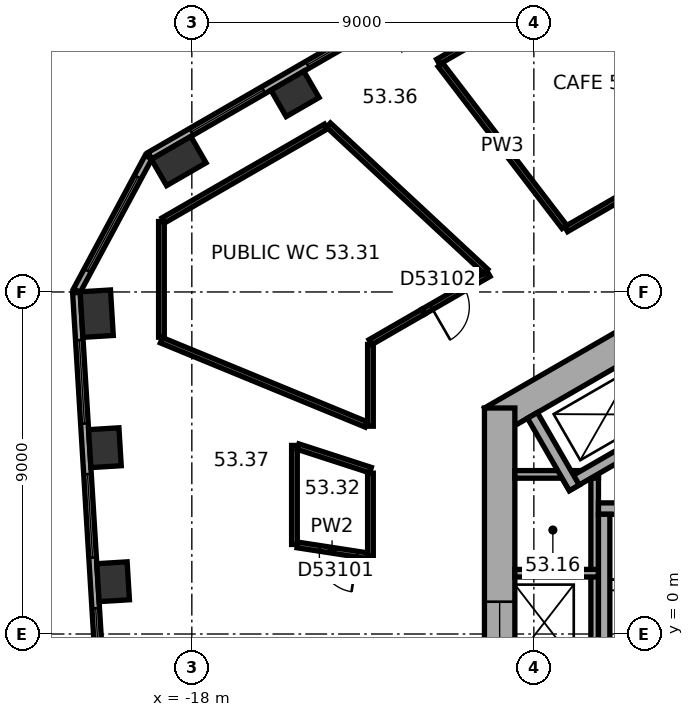
"""IFC4 building model, lengths in metres.
Left out: names, types, materials, properties, quantities, classifications, styles, units other than length and angle.
Written with IfcOpenShell. Run it as: python <this file> out.ifc"""

import sys

from ifc_helpers import new_model, si_unit, direction, frame, frame_2d, origin, origin_2d, place, context, subcontext, project, spatial, rectangle, extrude, element, fill, save


model = new_model("IFC4")
c1 = context("Model", 3, precision=1e-05, world=origin(), true_north=direction((0.0, 1.0)))
c2 = subcontext(c1, "Body", "Model", "MODEL_VIEW")
j1 = project(units=[si_unit("LENGTHUNIT", "METRE"), si_unit("PLANEANGLEUNIT", "RADIAN")], contexts=[c1])
p1 = place(None, origin())
s1 = spatial("IfcSite", under=j1, at=p1, CompositionType="ELEMENT")
p2 = place(p1, origin())
s2 = spatial("IfcBuilding", under=s1, at=p2, CompositionType="ELEMENT")
p3 = place(p2, frame((0.0, 0.0, 214.3)))
s3 = spatial("IfcBuildingStorey", under=s2, at=p3, CompositionType="ELEMENT", Elevation=214.3)
p4 = place(p3, frame((-15.285, 14.211, 0.0), z_axis=(0.0, 0.0, 1.0), x_axis=(-0.866025403784, -0.5, 0.0)))
e1 = element("IfcColumn", 1, at=p4, inside=s3, PredefinedType="COLUMN", context=c2, shape_type="SweptSolid", body=[
    extrude(rectangle(XDim=1.0, YDim=0.8, at=origin_2d()), origin(), (0.0, 0.0, 1.0), 7.4),
])
for number, where, z_axis, x_axis in (
    (2, (-18.345, 12.445, 0.0), (0.0, 0.0, 1.0), (-0.866, -0.5, 0.0)),
    (3, (-20.503, 8.429, 0.0), (0.0, 0.0, 1.0), (0.061, -0.998, 0.0)),
):
    element("IfcColumn", number, at=place(p3, frame(where, z_axis=z_axis, x_axis=x_axis)), inside=s3, PredefinedType="COLUMN", context=c2, shape_type="SweptSolid", body=[
        extrude(rectangle(XDim=1.2, YDim=0.8, at=origin_2d()), origin(), (0.0, 0.0, 1.0), 7.4),
    ])
for number, where, z_axis, x_axis in (
    (4, (-20.287, 4.902, 0.0), (0.0, 0.0, 1.0), (0.061, -0.998, 0.0)),
    (5, (-20.071, 1.375, 0.0), (0.0, 0.0, 1.0), (0.061, -0.998, 0.0)),
):
    element("IfcColumn", number, at=place(p3, frame(where, z_axis=z_axis, x_axis=x_axis)), inside=s3, PredefinedType="COLUMN", context=c2, shape_type="SweptSolid", body=[
        extrude(rectangle(XDim=1.0, YDim=0.8, at=origin_2d()), origin(), (0.0, 0.0, 1.0), 7.4),
    ])
p5 = place(p3, frame((0.2, 11.547, 0.0), z_axis=(0.0, 0.0, 1.0), x_axis=(-0.866023897231, -0.500002609418, 0.0)))
e6 = element("IfcWall", 6, at=p5, inside=s3, PredefinedType="SHEAR", context=c2, shape_type="SweptSolid", body=[
    extrude(rectangle(XDim=11.894, YDim=0.8, at=frame_2d((5.947, 0.0))), origin(), (0.0, 0.0, 1.0), 7.4),
])
p6 = place(p5, frame((6.147, 0.0, 0.0)))
e7 = element("IfcOpeningElement", 7, at=p6, cuts=e6, PredefinedType="OPENING", context=c2, shape_type="SweptSolid", body=[
    extrude(rectangle(XDim=1.5, YDim=2.1, at=frame_2d((0.75, 1.05))), frame((0.0, 0.41, 0.0), z_axis=(0.0, -1.0, 0.0), x_axis=(1.0, 0.0, 0.0)), (0.0, 0.0, 1.0), 0.82),
])
p7 = place(p5, frame((1.697, 0.0, 0.0)))
e8 = element("IfcOpeningElement", 8, at=p7, cuts=e6, PredefinedType="OPENING", context=c2, shape_type="SweptSolid", body=[
    extrude(rectangle(XDim=0.9, YDim=2.1, at=frame_2d((0.45, 1.05))), frame((0.0, 0.41, 0.0), z_axis=(0.0, -1.0, 0.0), x_axis=(1.0, 0.0, 0.0)), (0.0, 0.0, 1.0), 0.82),
])
p8 = place(p5, frame((4.297, 0.0, 0.0)))
e9 = element("IfcOpeningElement", 9, at=p8, cuts=e6, PredefinedType="OPENING", context=c2, shape_type="SweptSolid", body=[
    extrude(rectangle(XDim=0.9, YDim=2.1, at=frame_2d((0.45, 1.05))), frame((0.0, 0.41, 0.0), z_axis=(0.0, -1.0, 0.0), x_axis=(1.0, 0.0, 0.0)), (0.0, 0.0, 1.0), 0.82),
])
p9 = place(p3, frame((-9.9, 5.947, 0.0), z_axis=(0.0, 0.0, 1.0), x_axis=(0.0, -1.0, 0.0)))
e10 = element("IfcWall", 10, at=p9, inside=s3, PredefinedType="SHEAR", context=c2, shape_type="SweptSolid", body=[
    extrude(rectangle(XDim=11.894, YDim=0.8, at=frame_2d((5.947, 0.0))), origin(), (0.0, 0.0, 1.0), 7.4),
])
p10 = place(p9, frame((5.097, 0.0, 0.0)))
e11 = element("IfcOpeningElement", 11, at=p10, cuts=e10, PredefinedType="OPENING", context=c2, shape_type="SweptSolid", body=[
    extrude(rectangle(XDim=1.1, YDim=2.1, at=frame_2d((0.55, 1.05))), frame((0.0, 0.41, 0.0), z_axis=(0.0, -1.0, 0.0), x_axis=(1.0, 0.0, 0.0)), (0.0, 0.0, 1.0), 0.82),
])
p11 = place(p9, frame((7.697, 0.0, 0.0)))
e12 = element("IfcOpeningElement", 12, at=p11, cuts=e10, PredefinedType="OPENING", context=c2, shape_type="SweptSolid", body=[
    extrude(rectangle(XDim=1.1, YDim=2.1, at=frame_2d((0.55, 1.05))), frame((0.0, 0.41, 0.0), z_axis=(0.0, -1.0, 0.0), x_axis=(1.0, 0.0, 0.0)), (0.0, 0.0, 1.0), 0.82),
])
p12 = place(p3, frame((-2.786, 22.005, 0.0), z_axis=(0.0, 0.0, 1.0), x_axis=(-0.866026555358, -0.49999800541, 0.0)))
e13 = element("IfcWall", 13, at=p12, inside=s3, PredefinedType="STANDARD", context=c2, shape_type="SweptSolid", body=[
    extrude(rectangle(XDim=18.841, YDim=0.2, at=frame_2d((9.421, 0.0))), origin(), (0.0, 0.0, 1.0), 7.4),
])
p13 = place(p12, frame((1.254, 0.0, 0.8)))
e14 = element("IfcOpeningElement", 14, at=p13, cuts=e13, PredefinedType="OPENING", context=c2, shape_type="SweptSolid", body=[
    extrude(rectangle(XDim=2.2, YDim=4.2, at=frame_2d((1.1, 2.1))), frame((0.0, 0.11, 0.0), z_axis=(0.0, -1.0, 0.0), x_axis=(1.0, 0.0, 0.0)), (0.0, 0.0, 1.0), 0.22),
])
p14 = place(p12, frame((4.788, 0.0, 0.8)))
e15 = element("IfcOpeningElement", 15, at=p14, cuts=e13, PredefinedType="OPENING", context=c2, shape_type="SweptSolid", body=[
    extrude(rectangle(XDim=2.2, YDim=4.2, at=frame_2d((1.1, 2.1))), frame((0.0, 0.11, 0.0), z_axis=(0.0, -1.0, 0.0), x_axis=(1.0, 0.0, 0.0)), (0.0, 0.0, 1.0), 0.22),
])
p15 = place(p12, frame((8.321, 0.0, 0.8)))
e16 = element("IfcOpeningElement", 16, at=p15, cuts=e13, PredefinedType="OPENING", context=c2, shape_type="SweptSolid", body=[
    extrude(rectangle(XDim=2.2, YDim=4.2, at=frame_2d((1.1, 2.1))), frame((0.0, 0.11, 0.0), z_axis=(0.0, -1.0, 0.0), x_axis=(1.0, 0.0, 0.0)), (0.0, 0.0, 1.0), 0.22),
])
p16 = place(p12, frame((11.855, 0.0, 0.8)))
e17 = element("IfcOpeningElement", 17, at=p16, cuts=e13, PredefinedType="OPENING", context=c2, shape_type="SweptSolid", body=[
    extrude(rectangle(XDim=2.2, YDim=4.2, at=frame_2d((1.1, 2.1))), frame((0.0, 0.11, 0.0), z_axis=(0.0, -1.0, 0.0), x_axis=(1.0, 0.0, 0.0)), (0.0, 0.0, 1.0), 0.22),
])
p17 = place(p12, frame((15.389, 0.0, 0.8)))
e18 = element("IfcOpeningElement", 18, at=p17, cuts=e13, PredefinedType="OPENING", context=c2, shape_type="SweptSolid", body=[
    extrude(rectangle(XDim=2.2, YDim=4.2, at=frame_2d((1.1, 2.1))), frame((0.0, 0.11, 0.0), z_axis=(0.0, -1.0, 0.0), x_axis=(1.0, 0.0, 0.0)), (0.0, 0.0, 1.0), 0.22),
])
p18 = place(p3, frame((-19.141, 12.545, 0.0), z_axis=(0.0, 0.0, 1.0), x_axis=(-0.473306370921, -0.880897882416, 0.0)))
e19 = element("IfcWall", 19, at=p18, inside=s3, PredefinedType="STANDARD", context=c2, shape_type="SweptSolid", body=[
    extrude(rectangle(XDim=3.983, YDim=0.2, at=frame_2d((1.991, 0.0))), origin(), (0.0, 0.0, 1.0), 7.4),
])
p19 = place(p18, frame((0.591, 0.0, 0.8)))
e20 = element("IfcOpeningElement", 20, at=p19, cuts=e19, PredefinedType="OPENING", context=c2, shape_type="SweptSolid", body=[
    extrude(rectangle(XDim=2.8, YDim=4.2, at=frame_2d((1.4, 2.1))), frame((0.0, 0.11, 0.0), z_axis=(0.0, -1.0, 0.0), x_axis=(1.0, 0.0, 0.0)), (0.0, 0.0, 1.0), 0.22),
])
p20 = place(p3, frame((-21.038, 8.984, 0.0), z_axis=(0.0, 0.0, 1.0), x_axis=(0.061043935634, -0.998135079998, 0.0)))
e21 = element("IfcWall", 21, at=p20, inside=s3, PredefinedType="STANDARD", context=c2, shape_type="SweptSolid", body=[
    extrude(rectangle(XDim=18.841, YDim=0.2, at=frame_2d((9.421, 0.0))), origin(), (0.0, 0.0, 1.0), 7.4),
])
p21 = place(p20, frame((1.253, 0.0, 0.8)))
e22 = element("IfcOpeningElement", 22, at=p21, cuts=e21, PredefinedType="OPENING", context=c2, shape_type="SweptSolid", body=[
    extrude(rectangle(XDim=2.2, YDim=4.2, at=frame_2d((1.1, 2.1))), frame((0.0, 0.11, 0.0), z_axis=(0.0, -1.0, 0.0), x_axis=(1.0, 0.0, 0.0)), (0.0, 0.0, 1.0), 0.22),
])
p22 = place(p20, frame((4.786, 0.0, 0.8)))
e23 = element("IfcOpeningElement", 23, at=p22, cuts=e21, PredefinedType="OPENING", context=c2, shape_type="SweptSolid", body=[
    extrude(rectangle(XDim=2.2, YDim=4.2, at=frame_2d((1.1, 2.1))), frame((0.0, 0.11, 0.0), z_axis=(0.0, -1.0, 0.0), x_axis=(1.0, 0.0, 0.0)), (0.0, 0.0, 1.0), 0.22),
])
p23 = place(p20, frame((8.32, 0.0, 0.8)))
e24 = element("IfcOpeningElement", 24, at=p23, cuts=e21, PredefinedType="OPENING", context=c2, shape_type="SweptSolid", body=[
    extrude(rectangle(XDim=2.2, YDim=4.2, at=frame_2d((1.1, 2.1))), frame((0.0, 0.11, 0.0), z_axis=(0.0, -1.0, 0.0), x_axis=(1.0, 0.0, 0.0)), (0.0, 0.0, 1.0), 0.22),
])
p24 = place(p20, frame((11.854, 0.0, 0.8)))
e25 = element("IfcOpeningElement", 25, at=p24, cuts=e21, PredefinedType="OPENING", context=c2, shape_type="SweptSolid", body=[
    extrude(rectangle(XDim=2.2, YDim=4.2, at=frame_2d((1.1, 2.1))), frame((0.0, 0.11, 0.0), z_axis=(0.0, -1.0, 0.0), x_axis=(1.0, 0.0, 0.0)), (0.0, 0.0, 1.0), 0.22),
])
p25 = place(p20, frame((15.387, 0.0, 0.8)))
e26 = element("IfcOpeningElement", 26, at=p25, cuts=e21, PredefinedType="OPENING", context=c2, shape_type="SweptSolid", body=[
    extrude(rectangle(XDim=2.2, YDim=4.2, at=frame_2d((1.1, 2.1))), frame((0.0, 0.11, 0.0), z_axis=(0.0, -1.0, 0.0), x_axis=(1.0, 0.0, 0.0)), (0.0, 0.0, 1.0), 0.22),
])
p26 = place(p3, frame((-7.4, 4.3, 0.0), z_axis=(0.0, 0.0, 1.0), x_axis=(0.0, -1.0, 0.0)))
e27 = element("IfcWall", 27, at=p26, inside=s3, PredefinedType="PARTITIONING", context=c2, shape_type="SweptSolid", body=[
    extrude(rectangle(XDim=8.0, YDim=0.2, at=frame_2d((4.0, 0.0))), origin(), (0.0, 0.0, 1.0), 7.12),
])
for number, where, z_axis, x_axis in (
    (28, (-7.3, 4.2, 0.0), (0.0, 0.0, 1.0), (-1.0, 0.0, 0.0)),
    (29, (-7.3, 1.6, 0.0), (0.0, 0.0, 1.0), (-1.0, 0.0, 0.0)),
):
    element("IfcWall", number, at=place(p3, frame(where, z_axis=z_axis, x_axis=x_axis)), inside=s3, PredefinedType="PARTITIONING", context=c2, shape_type="SweptSolid", body=[
        extrude(rectangle(XDim=2.2, YDim=0.2, at=frame_2d((1.1, 0.0))), origin(), (0.0, 0.0, 1.0), 7.12),
    ])
p27 = place(p3, frame((-2.6, 3.3, 0.0), z_axis=(0.0, 0.0, 1.0), x_axis=(-1.0, 0.0, 0.0)))
e30 = element("IfcWall", 30, at=p27, inside=s3, PredefinedType="SHEAR", context=c2, shape_type="SweptSolid", body=[
    extrude(rectangle(XDim=4.7, YDim=0.3, at=frame_2d((2.35, 0.0))), origin(), (0.0, 0.0, 1.0), 7.12),
])
p28 = place(p27, frame((0.8, 0.0, 0.0)))
e31 = element("IfcOpeningElement", 31, at=p28, cuts=e30, PredefinedType="OPENING", context=c2, shape_type="SweptSolid", body=[
    extrude(rectangle(XDim=1.2, YDim=2.1, at=frame_2d((0.6, 1.05))), frame((0.0, 0.16, 0.0), z_axis=(0.0, -1.0, 0.0), x_axis=(1.0, 0.0, 0.0)), (0.0, 0.0, 1.0), 0.32),
])
p29 = place(p3, frame((-7.15, 3.15, 0.0), z_axis=(0.0, 0.0, 1.0), x_axis=(0.0, -1.0, 0.0)))
e32 = element("IfcWall", 32, at=p29, inside=s3, PredefinedType="SHEAR", context=c2, shape_type="SweptSolid", body=[
    extrude(rectangle(XDim=7.06, YDim=0.3, at=frame_2d((3.53, 0.0))), origin(), (0.0, 0.0, 1.0), 7.12),
])
p30 = place(p3, frame((-5.24, 5.577, 0.0), z_axis=(0.0, 0.0, 1.0), x_axis=(-0.866014461049, -0.500018952895, 0.0)))
e33 = element("IfcWall", 33, at=p30, inside=s3, PredefinedType="SHEAR", context=c2, shape_type="SweptSolid", body=[
    extrude(rectangle(XDim=3.35, YDim=0.3, at=frame_2d((1.675, 0.0))), origin(), (0.0, 0.0, 1.0), 7.12),
])
p31 = place(p3, frame((-7.937, 3.847, 0.0), z_axis=(0.0, 0.0, 1.0), x_axis=(-0.50002983664, 0.866008176907, 0.0)))
e34 = element("IfcWall", 34, at=p31, inside=s3, PredefinedType="SHEAR", context=c2, shape_type="SweptSolid", body=[
    extrude(rectangle(XDim=2.2, YDim=0.3, at=frame_2d((1.1, 0.0))), origin(), (0.0, 0.0, 1.0), 7.12),
])
p32 = place(p3, frame((-13.399, 2.063, 0.0), z_axis=(0.0, 0.0, 1.0), x_axis=(-0.988354850272, 0.152166651878, 0.0)))
e35 = element("IfcWall", 35, at=p32, inside=s3, PredefinedType="PARTITIONING", context=c2, shape_type="SweptSolid", body=[
    extrude(rectangle(XDim=1.844, YDim=0.15, at=frame_2d((0.922, 0.0))), origin(), (0.0, 0.0, 1.0), 7.12),
])
p33 = place(p32, frame((0.25, 0.0, 0.0)))
e36 = element("IfcOpeningElement", 36, at=p33, cuts=e35, PredefinedType="OPENING", context=c2, shape_type="SweptSolid", body=[
    extrude(rectangle(XDim=1.0, YDim=2.1, at=frame_2d((0.5, 1.05))), frame((0.0, 0.085, 0.0), z_axis=(0.0, -1.0, 0.0), x_axis=(1.0, 0.0, 0.0)), (0.0, 0.0, 1.0), 0.17),
])
p34 = place(p3, frame((-15.3, 2.355, 0.0), z_axis=(0.0, 0.0, 1.0), x_axis=(0.0, 1.0, 0.0)))
e37 = element("IfcWall", 37, at=p34, inside=s3, PredefinedType="PARTITIONING", context=c2, shape_type="SweptSolid", body=[
    extrude(rectangle(XDim=2.606, YDim=0.15, at=frame_2d((1.303, 0.0))), origin(), (0.0, 0.0, 1.0), 7.12),
])
p35 = place(p3, frame((-13.3, 4.233, 0.0), z_axis=(0.0, 0.0, 1.0), x_axis=(0.0, -1.0, 0.0)))
e38 = element("IfcWall", 38, at=p35, inside=s3, PredefinedType="PARTITIONING", context=c2, shape_type="SweptSolid", body=[
    extrude(rectangle(XDim=2.185, YDim=0.15, at=frame_2d((1.093, 0.0))), origin(), (0.0, 0.0, 1.0), 7.12),
])
p36 = place(p3, frame((-15.205, 4.931, 0.0), z_axis=(0.0, 0.0, 1.0), x_axis=(0.951236355981, -0.308462955733, 0.0)))
e39 = element("IfcWall", 39, at=p36, inside=s3, PredefinedType="PARTITIONING", context=c2, shape_type="SweptSolid", body=[
    extrude(rectangle(XDim=2.002, YDim=0.15, at=frame_2d((1.001, 0.0))), origin(), (0.0, 0.0, 1.0), 7.12),
])
p37 = place(p3, frame((-13.411, 5.514, 0.0), z_axis=(0.0, 0.0, 1.0), x_axis=(-0.924874082037, 0.380273496809, 0.0)))
e40 = element("IfcWall", 40, at=p37, inside=s3, PredefinedType="PARTITIONING", context=c2, shape_type="SweptSolid", body=[
    extrude(rectangle(XDim=5.827, YDim=0.15, at=frame_2d((2.914, 0.0))), origin(), (0.0, 0.0, 1.0), 6.57),
])
p38 = place(p3, frame((-13.3, 7.619, 0.0), z_axis=(0.0, 0.0, 1.0), x_axis=(0.0, -1.0, 0.0)))
e41 = element("IfcWall", 41, at=p38, inside=s3, PredefinedType="PARTITIONING", context=c2, shape_type="SweptSolid", body=[
    extrude(rectangle(XDim=2.151, YDim=0.15, at=frame_2d((1.075, 0.0))), origin(), (0.0, 0.0, 1.0), 7.12),
])
p39 = place(p3, frame((-18.8, 7.81, 0.0), z_axis=(0.0, 0.0, 1.0), x_axis=(0.0, 1.0, 0.0)))
e42 = element("IfcWall", 42, at=p39, inside=s3, PredefinedType="PARTITIONING", context=c2, shape_type="SweptSolid", body=[
    extrude(rectangle(XDim=3.044, YDim=0.15, at=frame_2d((1.522, 0.0))), origin(), (0.0, 0.0, 1.0), 7.12),
])
p40 = place(p3, frame((-11.915, 8.479, 0.0), z_axis=(0.0, 0.0, 1.0), x_axis=(-0.86604576824, -0.499964726069, 0.0)))
e43 = element("IfcWall", 43, at=p40, inside=s3, PredefinedType="PARTITIONING", context=c2, shape_type="SweptSolid", body=[
    extrude(rectangle(XDim=1.599, YDim=0.15, at=frame_2d((0.8, 0.0))), origin(), (0.0, 0.0, 1.0), 7.12),
])
p41 = place(p3, frame((-11.915, 8.479, 0.0), z_axis=(0.0, 0.0, 1.0), x_axis=(0.866108031567, 0.499856857165, 0.0)))
e44 = element("IfcWall", 44, at=p41, inside=s3, PredefinedType="PARTITIONING", context=c2, shape_type="SweptSolid", body=[
    extrude(rectangle(XDim=1.992, YDim=0.15, at=frame_2d((0.996, 0.0))), origin(), (0.0, 0.0, 1.0), 7.12),
])
p42 = place(p41, frame((0.25, 0.0, 0.0)))
e45 = element("IfcOpeningElement", 45, at=p42, cuts=e44, PredefinedType="OPENING", context=c2, shape_type="SweptSolid", body=[
    extrude(rectangle(XDim=1.0, YDim=2.1, at=frame_2d((0.5, 1.05))), frame((0.0, 0.085, 0.0), z_axis=(0.0, -1.0, 0.0), x_axis=(1.0, 0.0, 0.0)), (0.0, 0.0, 1.0), 0.17),
])
p43 = place(p3, frame((-8.199, 10.716, 0.0), z_axis=(0.0, 0.0, 1.0), x_axis=(-0.607666232271, 0.794192514544, 0.0)))
e46 = element("IfcWall", 46, at=p43, inside=s3, PredefinedType="PARTITIONING", context=c2, shape_type="SweptSolid", body=[
    extrude(rectangle(XDim=5.366, YDim=0.15, at=frame_2d((2.683, 0.0))), origin(), (0.0, 0.0, 1.0), 7.12),
])
p44 = place(p3, frame((-18.748, 10.884, 0.0), z_axis=(0.0, 0.0, 1.0), x_axis=(0.866021674193, 0.500006459787, 0.0)))
e47 = element("IfcWall", 47, at=p44, inside=s3, PredefinedType="PARTITIONING", context=c2, shape_type="SweptSolid", body=[
    extrude(rectangle(XDim=4.936, YDim=0.15, at=frame_2d((2.468, 0.0))), origin(), (0.0, 0.0, 1.0), 7.12),
])
p45 = place(p3, frame((-14.404, 13.392, 0.0), z_axis=(0.0, 0.0, 1.0), x_axis=(0.73235196953, -0.680926275543, 0.0)))
e48 = element("IfcWall", 48, at=p45, inside=s3, PredefinedType="PARTITIONING", context=c2, shape_type="SweptSolid", body=[
    extrude(rectangle(XDim=5.654, YDim=0.15, at=frame_2d((2.827, 0.0))), origin(), (0.0, 0.0, 1.0), 6.57),
])
p46 = place(p3, frame((-2.03, 14.186, 0.0), z_axis=(0.0, 0.0, 1.0), x_axis=(-0.866034287694, -0.499984612302, 0.0)))
e49 = element("IfcWall", 49, at=p46, inside=s3, PredefinedType="PARTITIONING", context=c2, shape_type="SweptSolid", body=[
    extrude(rectangle(XDim=7.067, YDim=0.15, at=frame_2d((3.534, 0.0))), origin(), (0.0, 0.0, 1.0), 7.12),
])
p47 = place(p46, frame((0.55, 0.0, 0.0)))
e50 = element("IfcOpeningElement", 50, at=p47, cuts=e49, PredefinedType="OPENING", context=c2, shape_type="SweptSolid", body=[
    extrude(rectangle(XDim=1.4, YDim=2.4, at=frame_2d((0.7, 1.2))), frame((0.0, 0.085, 0.0), z_axis=(0.0, -1.0, 0.0), x_axis=(1.0, 0.0, 0.0)), (0.0, 0.0, 1.0), 0.17),
])
p48 = place(p3, frame((-11.521, 15.057, 0.0), z_axis=(0.0, 0.0, 1.0), x_axis=(0.866020763381, 0.500008037328, 0.0)))
e51 = element("IfcWall", 51, at=p48, inside=s3, PredefinedType="PARTITIONING", context=c2, shape_type="SweptSolid", body=[
    extrude(rectangle(XDim=9.99, YDim=0.15, at=frame_2d((4.995, 0.0))), origin(), (0.0, 0.0, 1.0), 7.12),
])
p49 = place(p16, origin())
e52 = element("IfcWindow", 52, at=p49, inside=s3, PartitioningType="SINGLE_PANEL", PredefinedType="WINDOW", context=c2, shape_type="SweptSolid", body=[
    extrude(rectangle(XDim=2.2, YDim=4.2, at=frame_2d((1.1, 2.1))), frame((0.0, 0.03, 0.0), z_axis=(0.0, -1.0, 0.0), x_axis=(1.0, 0.0, 0.0)), (0.0, 0.0, 1.0), 0.06),
])
fill(e17, e52)
p50 = place(p17, origin())
e53 = element("IfcWindow", 53, at=p50, inside=s3, PartitioningType="SINGLE_PANEL", PredefinedType="WINDOW", context=c2, shape_type="SweptSolid", body=[
    extrude(rectangle(XDim=2.2, YDim=4.2, at=frame_2d((1.1, 2.1))), frame((0.0, 0.03, 0.0), z_axis=(0.0, -1.0, 0.0), x_axis=(1.0, 0.0, 0.0)), (0.0, 0.0, 1.0), 0.06),
])
fill(e18, e53)
p51 = place(p19, origin())
e54 = element("IfcWindow", 54, at=p51, inside=s3, PartitioningType="SINGLE_PANEL", PredefinedType="WINDOW", context=c2, shape_type="SweptSolid", body=[
    extrude(rectangle(XDim=2.8, YDim=4.2, at=frame_2d((1.4, 2.1))), frame((0.0, 0.03, 0.0), z_axis=(0.0, -1.0, 0.0), x_axis=(1.0, 0.0, 0.0)), (0.0, 0.0, 1.0), 0.06),
])
fill(e20, e54)
p52 = place(p21, origin())
e55 = element("IfcWindow", 55, at=p52, inside=s3, PartitioningType="SINGLE_PANEL", PredefinedType="WINDOW", context=c2, shape_type="SweptSolid", body=[
    extrude(rectangle(XDim=2.2, YDim=4.2, at=frame_2d((1.1, 2.1))), frame((0.0, 0.03, 0.0), z_axis=(0.0, -1.0, 0.0), x_axis=(1.0, 0.0, 0.0)), (0.0, 0.0, 1.0), 0.06),
])
fill(e22, e55)
p53 = place(p22, origin())
e56 = element("IfcWindow", 56, at=p53, inside=s3, PartitioningType="SINGLE_PANEL", PredefinedType="WINDOW", context=c2, shape_type="SweptSolid", body=[
    extrude(rectangle(XDim=2.2, YDim=4.2, at=frame_2d((1.1, 2.1))), frame((0.0, 0.03, 0.0), z_axis=(0.0, -1.0, 0.0), x_axis=(1.0, 0.0, 0.0)), (0.0, 0.0, 1.0), 0.06),
])
fill(e23, e56)
p54 = place(p23, origin())
e57 = element("IfcWindow", 57, at=p54, inside=s3, PartitioningType="SINGLE_PANEL", PredefinedType="WINDOW", context=c2, shape_type="SweptSolid", body=[
    extrude(rectangle(XDim=2.2, YDim=4.2, at=frame_2d((1.1, 2.1))), frame((0.0, 0.03, 0.0), z_axis=(0.0, -1.0, 0.0), x_axis=(1.0, 0.0, 0.0)), (0.0, 0.0, 1.0), 0.06),
])
fill(e24, e57)
p55 = place(p10, origin())
e58 = element("IfcDoor", 58, at=p55, inside=s3, OperationType="DOUBLE_DOOR_SLIDING", PredefinedType="DOOR", context=c2, shape_type="SweptSolid", body=[
    extrude(rectangle(XDim=1.1, YDim=2.1, at=frame_2d((0.55, 1.05))), frame((0.0, 0.025, 0.0), z_axis=(0.0, -1.0, 0.0), x_axis=(1.0, 0.0, 0.0)), (0.0, 0.0, 1.0), 0.05),
])
fill(e11, e58)
p56 = place(p33, origin())
e59 = element("IfcDoor", 59, at=p56, inside=s3, OperationType="SINGLE_SWING_LEFT", PredefinedType="DOOR", context=c2, shape_type="SweptSolid", body=[
    extrude(rectangle(XDim=1.0, YDim=2.1, at=frame_2d((0.5, 1.05))), frame((0.0, 0.025, 0.0), z_axis=(0.0, -1.0, 0.0), x_axis=(1.0, 0.0, 0.0)), (0.0, 0.0, 1.0), 0.05),
])
fill(e36, e59)
p57 = place(p42, origin())
e60 = element("IfcDoor", 60, at=p57, inside=s3, OperationType="SINGLE_SWING_LEFT", PredefinedType="DOOR", context=c2, shape_type="SweptSolid", body=[
    extrude(rectangle(XDim=1.0, YDim=2.1, at=frame_2d((0.5, 1.05))), frame((0.0, 0.025, 0.0), z_axis=(0.0, -1.0, 0.0), x_axis=(1.0, 0.0, 0.0)), (0.0, 0.0, 1.0), 0.05),
])
fill(e45, e60)
save(model, sys.argv[1])
